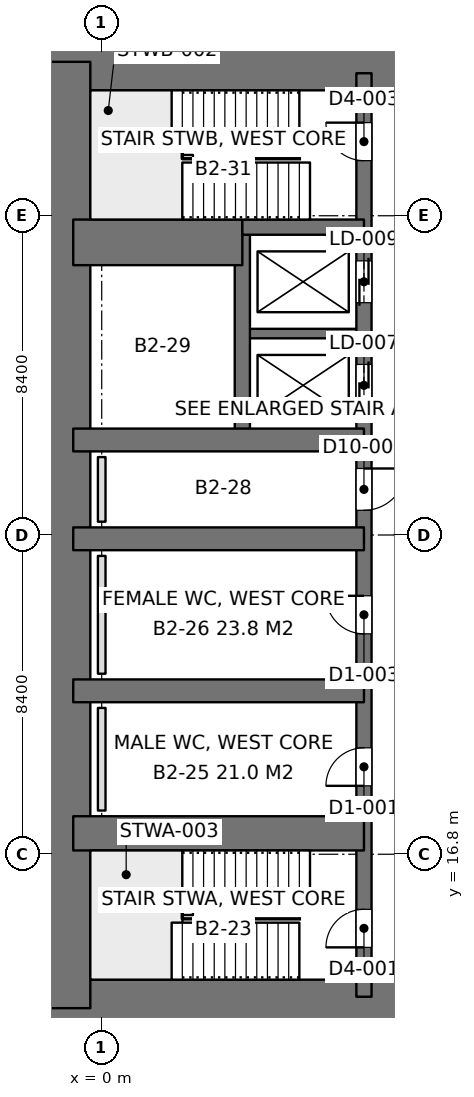
"""IFC4 building model, lengths in metres.
Left out: names, types, materials, properties, quantities, classifications, styles, units other than length and angle.
Written with IfcOpenShell. Run it as: python <this file> out.ifc"""

import sys

from ifc_helpers import new_model, si_unit, direction, frame, frame_2d, origin, place, context, subcontext, project, spatial, rectangle, extrude, element, fill, save


model = new_model("IFC4")
c1 = context("Model", 3, precision=1e-05, world=origin(), true_north=direction((0.0, 1.0)))
c2 = subcontext(c1, "Body", "Model", "MODEL_VIEW")
j1 = project(units=[si_unit("LENGTHUNIT", "METRE"), si_unit("PLANEANGLEUNIT", "RADIAN")], contexts=[c1])
p1 = place(None, origin())
s1 = spatial("IfcSite", under=j1, at=p1, CompositionType="ELEMENT")
p2 = place(p1, origin())
s2 = spatial("IfcBuilding", under=s1, at=p2, CompositionType="ELEMENT")
p3 = place(p2, frame((0.0, 0.0, -8.4)))
s3 = spatial("IfcBuildingStorey", under=s2, at=p3, CompositionType="ELEMENT", Elevation=-8.4)
p4 = place(p3, frame((-1.8, 12.75, 0.0), z_axis=(0.0, 0.0, 1.0), x_axis=(1.0, 0.0, 0.0)))
e1 = element("IfcWall", 1, at=p4, inside=s3, PredefinedType="SHEAR", context=c2, shape_type="SweptSolid", body=[
    extrude(rectangle(XDim=19.2, YDim=1.5, at=frame_2d((9.6, 0.0))), origin(), (0.0, 0.0, 1.0), 4.2),
])
p5 = place(p4, frame((9.55, 0.0, 0.0)))
e2 = element("IfcOpeningElement", 2, at=p5, cuts=e1, PredefinedType="OPENING", context=c2, shape_type="SweptSolid", body=[
    extrude(rectangle(XDim=1.8, YDim=2.4, at=frame_2d((0.9, 1.2))), frame((0.0, 0.76, 0.0), z_axis=(0.0, -1.0, 0.0), x_axis=(1.0, 0.0, 0.0)), (0.0, 0.0, 1.0), 1.52),
])
p6 = place(p3, frame((-1.8, 37.65, 0.0), z_axis=(0.0, 0.0, 1.0), x_axis=(1.0, 0.0, 0.0)))
e3 = element("IfcWall", 3, at=p6, inside=s3, PredefinedType="SHEAR", context=c2, shape_type="SweptSolid", body=[
    extrude(rectangle(XDim=19.2, YDim=1.5, at=frame_2d((9.6, 0.0))), origin(), (0.0, 0.0, 1.0), 4.2),
])
p7 = place(p6, frame((9.55, 0.0, 0.0)))
e4 = element("IfcOpeningElement", 4, at=p7, cuts=e3, PredefinedType="OPENING", context=c2, shape_type="SweptSolid", body=[
    extrude(rectangle(XDim=1.8, YDim=2.4, at=frame_2d((0.9, 1.2))), frame((0.0, 0.76, 0.0), z_axis=(0.0, -1.0, 0.0), x_axis=(1.0, 0.0, 0.0)), (0.0, 0.0, 1.0), 1.52),
])
p8 = place(p3, frame((-1.05, 12.75, 0.0), z_axis=(0.0, 0.0, 1.0), x_axis=(0.0, 1.0, 0.0)))
e5 = element("IfcWall", 5, at=p8, inside=s3, PredefinedType="SHEAR", context=c2, shape_type="SweptSolid", body=[
    extrude(rectangle(XDim=24.9, YDim=1.5, at=frame_2d((12.45, 0.0))), origin(), (0.0, 0.0, 1.0), 4.2),
])
p9 = place(p3, frame((6.9, 13.05, 0.0), z_axis=(0.0, 0.0, 1.0), x_axis=(0.0, 1.0, 0.0)))
e6 = element("IfcWall", 6, at=p9, inside=s3, PredefinedType="SHEAR", context=c2, shape_type="SweptSolid", body=[
    extrude(rectangle(XDim=24.3, YDim=0.4, at=frame_2d((12.15, 0.0))), origin(), (0.0, 0.0, 1.0), 4.2),
])
p10 = place(p9, frame((1.3, 0.0, 0.0)))
e7 = element("IfcOpeningElement", 7, at=p10, cuts=e6, PredefinedType="OPENING", context=c2, shape_type="SweptSolid", body=[
    extrude(rectangle(XDim=1.0, YDim=2.2, at=frame_2d((0.5, 1.1))), frame((0.0, 0.21, 0.0), z_axis=(0.0, -1.0, 0.0), x_axis=(1.0, 0.0, 0.0)), (0.0, 0.0, 1.0), 0.42),
])
p11 = place(p9, frame((22.0, 0.0, 0.0)))
e8 = element("IfcOpeningElement", 8, at=p11, cuts=e6, PredefinedType="OPENING", context=c2, shape_type="SweptSolid", body=[
    extrude(rectangle(XDim=1.0, YDim=2.2, at=frame_2d((0.5, 1.1))), frame((0.0, 0.21, 0.0), z_axis=(0.0, -1.0, 0.0), x_axis=(1.0, 0.0, 0.0)), (0.0, 0.0, 1.0), 0.42),
])
p12 = place(p9, frame((5.55, 0.0, 0.0)))
e9 = element("IfcOpeningElement", 9, at=p12, cuts=e6, PredefinedType="OPENING", context=c2, shape_type="SweptSolid", body=[
    extrude(rectangle(XDim=1.0, YDim=2.2, at=frame_2d((0.5, 1.1))), frame((0.0, 0.21, 0.0), z_axis=(0.0, -1.0, 0.0), x_axis=(1.0, 0.0, 0.0)), (0.0, 0.0, 1.0), 0.42),
])
p13 = place(p9, frame((9.55, 0.0, 0.0)))
e10 = element("IfcOpeningElement", 10, at=p13, cuts=e6, PredefinedType="OPENING", context=c2, shape_type="SweptSolid", body=[
    extrude(rectangle(XDim=1.0, YDim=2.2, at=frame_2d((0.5, 1.1))), frame((0.0, 0.21, 0.0), z_axis=(0.0, -1.0, 0.0), x_axis=(1.0, 0.0, 0.0)), (0.0, 0.0, 1.0), 0.42),
])
p14 = place(p9, frame((12.8, 0.0, 0.0)))
e11 = element("IfcOpeningElement", 11, at=p14, cuts=e6, PredefinedType="OPENING", context=c2, shape_type="SweptSolid", body=[
    extrude(rectangle(XDim=1.1, YDim=2.2, at=frame_2d((0.55, 1.1))), frame((0.0, 0.21, 0.0), z_axis=(0.0, -1.0, 0.0), x_axis=(1.0, 0.0, 0.0)), (0.0, 0.0, 1.0), 0.42),
])
p15 = place(p9, frame((15.538, 0.0, 0.0)))
e12 = element("IfcOpeningElement", 12, at=p15, cuts=e6, PredefinedType="OPENING", context=c2, shape_type="SweptSolid", body=[
    extrude(rectangle(XDim=1.1, YDim=2.2, at=frame_2d((0.55, 1.1))), frame((0.0, 0.21, 0.0), z_axis=(0.0, -1.0, 0.0), x_axis=(1.0, 0.0, 0.0)), (0.0, 0.0, 1.0), 0.42),
])
p16 = place(p9, frame((18.262, 0.0, 0.0)))
e13 = element("IfcOpeningElement", 13, at=p16, cuts=e6, PredefinedType="OPENING", context=c2, shape_type="SweptSolid", body=[
    extrude(rectangle(XDim=1.1, YDim=2.2, at=frame_2d((0.55, 1.1))), frame((0.0, 0.21, 0.0), z_axis=(0.0, -1.0, 0.0), x_axis=(1.0, 0.0, 0.0)), (0.0, 0.0, 1.0), 0.42),
])
p17 = place(p3, frame((-0.75, 17.35, 0.0), z_axis=(0.0, 0.0, 1.0), x_axis=(1.0, 0.0, 0.0)))
e14 = element("IfcWall", 14, at=p17, inside=s3, PredefinedType="SHEAR", context=c2, shape_type="SweptSolid", body=[
    extrude(rectangle(XDim=7.65, YDim=0.9, at=frame_2d((3.825, 0.0))), origin(), (0.0, 0.0, 1.0), 4.2),
])
for number, where, z_axis, x_axis in (
    (15, (-0.75, 21.1, 0.0), (0.0, 0.0, 1.0), (1.0, 0.0, 0.0)),
    (16, (-0.75, 25.1, 0.0), (0.0, 0.0, 1.0), (1.0, 0.0, 0.0)),
    (17, (-0.75, 27.7, 0.0), (0.0, 0.0, 1.0), (1.0, 0.0, 0.0)),
):
    element("IfcWall", number, at=place(p3, frame(where, z_axis=z_axis, x_axis=x_axis)), inside=s3, PredefinedType="SHEAR", context=c2, shape_type="SweptSolid", body=[
        extrude(rectangle(XDim=7.65, YDim=0.6, at=frame_2d((3.825, 0.0))), origin(), (0.0, 0.0, 1.0), 4.2),
    ])
p18 = place(p3, frame((-0.75, 32.9, 0.0), z_axis=(0.0, 0.0, 1.0), x_axis=(1.0, 0.0, 0.0)))
e18 = element("IfcWall", 18, at=p18, inside=s3, PredefinedType="SHEAR", context=c2, shape_type="SweptSolid", body=[
    extrude(rectangle(XDim=4.45, YDim=1.2, at=frame_2d((2.225, 0.0))), origin(), (0.0, 0.0, 1.0), 4.2),
])
p19 = place(p3, frame((3.7, 33.3, 0.0), z_axis=(0.0, 0.0, 1.0), x_axis=(1.0, 0.0, 0.0)))
e19 = element("IfcWall", 19, at=p19, inside=s3, PredefinedType="SHEAR", context=c2, shape_type="SweptSolid", body=[
    extrude(rectangle(XDim=3.2, YDim=0.4, at=frame_2d((1.6, 0.0))), origin(), (0.0, 0.0, 1.0), 4.2),
])
p20 = place(p3, frame((3.7, 27.7, 0.0), z_axis=(0.0, 0.0, 1.0), x_axis=(0.0, 1.0, 0.0)))
e20 = element("IfcWall", 20, at=p20, inside=s3, PredefinedType="SHEAR", context=c2, shape_type="SweptSolid", body=[
    extrude(rectangle(XDim=5.6, YDim=0.4, at=frame_2d((2.8, 0.0))), origin(), (0.0, 0.0, 1.0), 4.2),
])
p21 = place(p3, frame((3.7, 30.5, 0.0), z_axis=(0.0, 0.0, 1.0), x_axis=(1.0, 0.0, 0.0)))
e21 = element("IfcWall", 21, at=p21, inside=s3, PredefinedType="SHEAR", context=c2, shape_type="SweptSolid", body=[
    extrude(rectangle(XDim=3.2, YDim=0.25, at=frame_2d((1.6, 0.0))), origin(), (0.0, 0.0, 1.0), 4.2),
])
p22 = place(p3, frame((-0.75, 9.049, 0.0), z_axis=(0.0, 0.0, 1.0), x_axis=(0.0, 1.0, 0.0)))
e22 = element("IfcWall", 22, at=p22, inside=s3, PredefinedType="PARTITIONING", context=c2, shape_type="SweptSolid", body=[
    extrude(rectangle(XDim=3.531, YDim=0.25, at=frame_2d((1.766, 0.0))), origin(), (0.0, 0.0, 1.0), 3.85),
])
p23 = place(p3, frame((-0.75, 37.82, 0.0), z_axis=(0.0, 0.0, 1.0), x_axis=(0.0, 1.0, 0.0)))
e23 = element("IfcWall", 23, at=p23, inside=s3, PredefinedType="PARTITIONING", context=c2, shape_type="SweptSolid", body=[
    extrude(rectangle(XDim=3.531, YDim=0.25, at=frame_2d((1.766, 0.0))), origin(), (0.0, 0.0, 1.0), 3.85),
])
p24 = place(p23, frame((1.63, 0.0, 0.0)))
e24 = element("IfcOpeningElement", 24, at=p24, cuts=e23, PredefinedType="OPENING", context=c2, shape_type="SweptSolid", body=[
    extrude(rectangle(XDim=0.9, YDim=2.2, at=frame_2d((0.45, 1.1))), frame((0.0, 0.135, 0.0), z_axis=(0.0, -1.0, 0.0), x_axis=(1.0, 0.0, 0.0)), (0.0, 0.0, 1.0), 0.27),
])
p25 = place(p3, frame((0.0, 17.95, 0.0), z_axis=(0.0, 0.0, 1.0), x_axis=(0.0, 1.0, 0.0)))
e25 = element("IfcWall", 25, at=p25, inside=s3, PredefinedType="PLUMBINGWALL", context=c2, shape_type="SweptSolid", body=[
    extrude(rectangle(XDim=2.7, YDim=0.2, at=frame_2d((1.35, 0.0))), origin(), (0.0, 0.0, 1.0), 1.2),
])
p26 = place(p3, frame((0.0, 21.55, 0.0), z_axis=(0.0, 0.0, 1.0), x_axis=(0.0, 1.0, 0.0)))
e26 = element("IfcWall", 26, at=p26, inside=s3, PredefinedType="PLUMBINGWALL", context=c2, shape_type="SweptSolid", body=[
    extrude(rectangle(XDim=3.1, YDim=0.2, at=frame_2d((1.55, 0.0))), origin(), (0.0, 0.0, 1.0), 1.2),
])
p27 = place(p3, frame((0.0, 25.55, 0.0), z_axis=(0.0, 0.0, 1.0), x_axis=(0.0, 1.0, 0.0)))
e27 = element("IfcWall", 27, at=p27, inside=s3, PredefinedType="PLUMBINGWALL", context=c2, shape_type="SweptSolid", body=[
    extrude(rectangle(XDim=1.7, YDim=0.2, at=frame_2d((0.85, 0.0))), origin(), (0.0, 0.0, 1.0), 1.2),
])
p28 = place(p10, origin())
e28 = element("IfcDoor", 28, at=p28, inside=s3, OperationType="SINGLE_SWING_LEFT", PredefinedType="DOOR", context=c2, shape_type="SweptSolid", body=[
    extrude(rectangle(XDim=1.0, YDim=2.2, at=frame_2d((0.5, 1.1))), frame((0.0, 0.025, 0.0), z_axis=(0.0, -1.0, 0.0), x_axis=(1.0, 0.0, 0.0)), (0.0, 0.0, 1.0), 0.05),
])
fill(e7, e28)
p29 = place(p11, origin())
e29 = element("IfcDoor", 29, at=p29, inside=s3, OperationType="SINGLE_SWING_RIGHT", PredefinedType="DOOR", context=c2, shape_type="SweptSolid", body=[
    extrude(rectangle(XDim=1.0, YDim=2.2, at=frame_2d((0.5, 1.1))), frame((0.0, 0.025, 0.0), z_axis=(0.0, -1.0, 0.0), x_axis=(1.0, 0.0, 0.0)), (0.0, 0.0, 1.0), 0.05),
])
fill(e8, e29)
p30 = place(p12, origin())
e30 = element("IfcDoor", 30, at=p30, inside=s3, OperationType="SINGLE_SWING_LEFT", PredefinedType="DOOR", context=c2, shape_type="SweptSolid", body=[
    extrude(rectangle(XDim=1.0, YDim=2.2, at=frame_2d((0.5, 1.1))), frame((0.0, 0.025, 0.0), z_axis=(0.0, -1.0, 0.0), x_axis=(1.0, 0.0, 0.0)), (0.0, 0.0, 1.0), 0.05),
])
fill(e9, e30)
p31 = place(p13, origin())
e31 = element("IfcDoor", 31, at=p31, inside=s3, OperationType="SINGLE_SWING_RIGHT", PredefinedType="DOOR", context=c2, shape_type="SweptSolid", body=[
    extrude(rectangle(XDim=1.0, YDim=2.2, at=frame_2d((0.5, 1.1))), frame((0.0, 0.025, 0.0), z_axis=(0.0, -1.0, 0.0), x_axis=(1.0, 0.0, 0.0)), (0.0, 0.0, 1.0), 0.05),
])
fill(e10, e31)
p32 = place(p14, frame((1.1, 0.0, 0.0), z_axis=(0.0, 0.0, 1.0), x_axis=(-1.0, 0.0, 0.0)))
e32 = element("IfcDoor", 32, at=p32, inside=s3, OperationType="SINGLE_SWING_LEFT", PredefinedType="DOOR", context=c2, shape_type="SweptSolid", body=[
    extrude(rectangle(XDim=1.1, YDim=2.2, at=frame_2d((0.55, 1.1))), frame((0.0, 0.025, 0.0), z_axis=(0.0, -1.0, 0.0), x_axis=(1.0, 0.0, 0.0)), (0.0, 0.0, 1.0), 0.05),
])
fill(e11, e32)
p33 = place(p15, origin())
e33 = element("IfcDoor", 33, at=p33, inside=s3, OperationType="DOUBLE_DOOR_SLIDING", PredefinedType="DOOR", context=c2, shape_type="SweptSolid", body=[
    extrude(rectangle(XDim=1.1, YDim=2.2, at=frame_2d((0.55, 1.1))), frame((0.0, 0.025, 0.0), z_axis=(0.0, -1.0, 0.0), x_axis=(1.0, 0.0, 0.0)), (0.0, 0.0, 1.0), 0.05),
])
fill(e12, e33)
p34 = place(p16, origin())
e34 = element("IfcDoor", 34, at=p34, inside=s3, OperationType="DOUBLE_DOOR_SLIDING", PredefinedType="DOOR", context=c2, shape_type="SweptSolid", body=[
    extrude(rectangle(XDim=1.1, YDim=2.2, at=frame_2d((0.55, 1.1))), frame((0.0, 0.025, 0.0), z_axis=(0.0, -1.0, 0.0), x_axis=(1.0, 0.0, 0.0)), (0.0, 0.0, 1.0), 0.05),
])
fill(e13, e34)
save(model, sys.argv[1])
